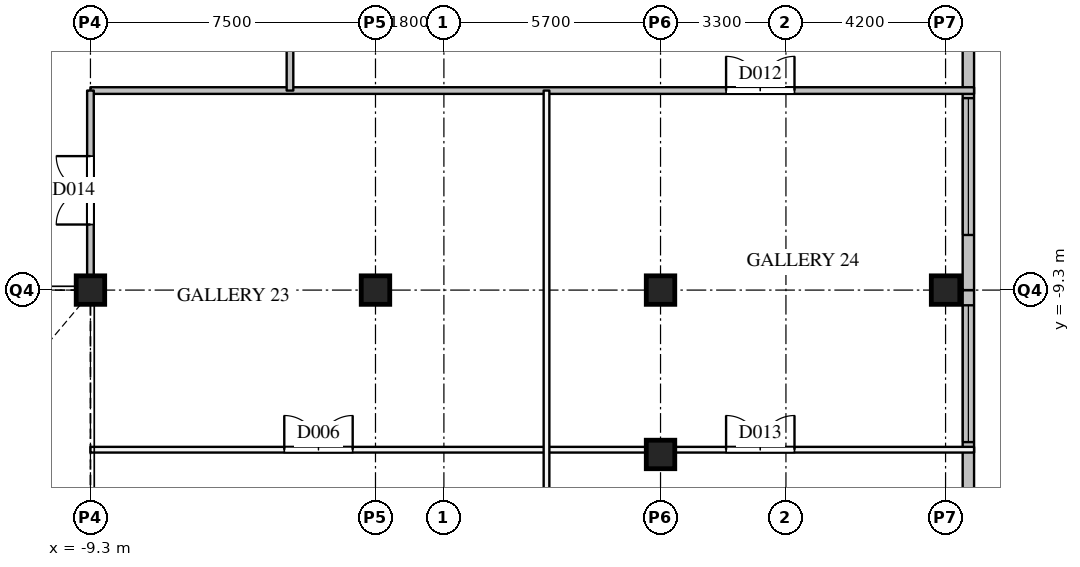
"""IFC4 building model, lengths in metres.
Left out: names, types, materials, properties, quantities, classifications, styles, units other than length and angle.
Written with IfcOpenShell. Run it as: python <this file> out.ifc"""

import sys

from ifc_helpers import new_model, si_unit, direction, frame, frame_2d, origin, origin_2d, place, context, subcontext, project, spatial, rectangle, extrude, element, fill, save


model = new_model("IFC4")
c1 = context("Model", 3, precision=1e-05, world=origin(), true_north=direction((0.0, 1.0)))
c2 = subcontext(c1, "Body", "Model", "MODEL_VIEW")
j1 = project(units=[si_unit("LENGTHUNIT", "METRE"), si_unit("PLANEANGLEUNIT", "RADIAN")], contexts=[c1])
p1 = place(None, origin())
s1 = spatial("IfcSite", under=j1, at=p1, CompositionType="ELEMENT")
p2 = place(p1, origin())
s2 = spatial("IfcBuilding", under=s1, at=p2, CompositionType="ELEMENT")
p3 = place(p2, frame((0.0, 0.0, 21.0)))
s3 = spatial("IfcBuildingStorey", under=s2, at=p3, CompositionType="ELEMENT", Elevation=21.0)
for number, where, z_axis, x_axis in (
    (1, (-9.3, -9.3, 0.0), (0.0, 0.0, 1.0), (1.0, 0.0, 0.0)),
    (2, (-1.8, -9.3, 0.0), (0.0, 0.0, 1.0), (1.0, 0.0, 0.0)),
    (3, (5.7, -9.3, 0.0), (0.0, 0.0, 1.0), (1.0, 0.0, 0.0)),
    (4, (13.2, -9.3, 0.0), (0.0, 0.0, 1.0), (1.0, 0.0, 0.0)),
    (5, (5.7, -13.625, 0.0), (0.0, 0.0, 1.0), (1.0, 0.0, 0.0)),
):
    element("IfcColumn", number, at=place(p3, frame(where, z_axis=z_axis, x_axis=x_axis)), inside=s3, PredefinedType="COLUMN", context=c2, shape_type="SweptSolid", body=[
        extrude(rectangle(XDim=0.75, YDim=0.75, at=origin_2d()), origin(), (0.0, 0.0, 1.0), 5.0),
    ])
p4 = place(p3, frame((13.8, -16.8, 0.0), z_axis=(0.0, 0.0, 1.0), x_axis=(0.0, 1.0, 0.0)))
e6 = element("IfcWall", 6, at=p4, inside=s3, PredefinedType="SOLIDWALL", context=c2, shape_type="SweptSolid", body=[
    extrude(rectangle(XDim=7.5, YDim=0.3, at=frame_2d((3.75, 0.0))), origin(), (0.0, 0.0, 1.0), 4.59),
])
p5 = place(p4, frame((3.5, 0.0, 2.4)))
e7 = element("IfcOpeningElement", 7, at=p5, cuts=e6, PredefinedType="OPENING", context=c2, shape_type="SweptSolid", body=[
    extrude(rectangle(XDim=3.6, YDim=1.2, at=frame_2d((1.8, 0.6))), frame((0.0, 0.16, 0.0), z_axis=(0.0, -1.0, 0.0), x_axis=(1.0, 0.0, 0.0)), (0.0, 0.0, 1.0), 0.32),
])
p6 = place(p3, frame((13.8, -9.3, 0.0), z_axis=(0.0, 0.0, 1.0), x_axis=(0.0, 1.0, 0.0)))
e8 = element("IfcWall", 8, at=p6, inside=s3, PredefinedType="SOLIDWALL", context=c2, shape_type="SweptSolid", body=[
    extrude(rectangle(XDim=7.5, YDim=0.3, at=frame_2d((3.75, 0.0))), origin(), (0.0, 0.0, 1.0), 4.59),
])
p7 = place(p6, frame((1.45, 0.0, 2.4)))
e9 = element("IfcOpeningElement", 9, at=p7, cuts=e8, PredefinedType="OPENING", context=c2, shape_type="SweptSolid", body=[
    extrude(rectangle(XDim=3.6, YDim=1.2, at=frame_2d((1.8, 0.6))), frame((0.0, 0.16, 0.0), z_axis=(0.0, -1.0, 0.0), x_axis=(1.0, 0.0, 0.0)), (0.0, 0.0, 1.0), 0.32),
])
p8 = place(p3, frame((-9.3, -4.05, 0.0), z_axis=(0.0, 0.0, 1.0), x_axis=(1.0, 0.0, 0.0)))
e10 = element("IfcWall", 10, at=p8, inside=s3, PredefinedType="PARTITIONING", context=c2, shape_type="SweptSolid", body=[
    extrude(rectangle(XDim=23.25, YDim=0.175, at=frame_2d((11.625, 0.0))), origin(), (0.0, 0.0, 1.0), 3.79),
])
p9 = place(p8, frame((16.725, 0.0, 0.0)))
e11 = element("IfcOpeningElement", 11, at=p9, cuts=e10, PredefinedType="OPENING", context=c2, shape_type="SweptSolid", body=[
    extrude(rectangle(XDim=1.8, YDim=2.1, at=frame_2d((0.9, 1.05))), frame((0.0, 0.097, 0.0), z_axis=(0.0, -1.0, 0.0), x_axis=(1.0, 0.0, 0.0)), (0.0, 0.0, 1.0), 0.195),
])
p10 = place(p3, frame((-9.3, -9.3, 0.0), z_axis=(0.0, 0.0, 1.0), x_axis=(0.0, 1.0, 0.0)))
e12 = element("IfcWall", 12, at=p10, inside=s3, PredefinedType="PARTITIONING", context=c2, shape_type="SweptSolid", body=[
    extrude(rectangle(XDim=5.25, YDim=0.175, at=frame_2d((2.625, 0.0))), origin(), (0.0, 0.0, 1.0), 3.79),
])
p11 = place(p10, frame((1.725, 0.0, 0.0)))
e13 = element("IfcOpeningElement", 13, at=p11, cuts=e12, PredefinedType="OPENING", context=c2, shape_type="SweptSolid", body=[
    extrude(rectangle(XDim=1.8, YDim=2.1, at=frame_2d((0.9, 1.05))), frame((0.0, 0.097, 0.0), z_axis=(0.0, -1.0, 0.0), x_axis=(1.0, 0.0, 0.0)), (0.0, 0.0, 1.0), 0.195),
])
p12 = place(p3, frame((-4.05, -4.05, 0.0), z_axis=(0.0, 0.0, 1.0), x_axis=(0.0, 1.0, 0.0)))
e14 = element("IfcWall", 14, at=p12, inside=s3, PredefinedType="PARTITIONING", context=c2, shape_type="SweptSolid", body=[
    extrude(rectangle(XDim=63.0, YDim=0.175, at=frame_2d((31.5, 0.0))), origin(), (0.0, 0.0, 1.0), 3.79),
])
p13 = place(p12, frame((52.45, 0.0, 0.0)))
e15 = element("IfcOpeningElement", 15, at=p13, cuts=e14, PredefinedType="OPENING", context=c2, shape_type="SweptSolid", body=[
    extrude(rectangle(XDim=1.0, YDim=2.1, at=frame_2d((0.5, 1.05))), frame((0.0, 0.097, 0.0), z_axis=(0.0, -1.0, 0.0), x_axis=(1.0, 0.0, 0.0)), (0.0, 0.0, 1.0), 0.195),
])
p14 = place(p12, frame((7.525, 0.0, 0.0)))
e16 = element("IfcOpeningElement", 16, at=p14, cuts=e14, PredefinedType="OPENING", context=c2, shape_type="SweptSolid", body=[
    extrude(rectangle(XDim=1.0, YDim=2.1, at=frame_2d((0.5, 1.05))), frame((0.0, 0.097, 0.0), z_axis=(0.0, -1.0, 0.0), x_axis=(1.0, 0.0, 0.0)), (0.0, 0.0, 1.0), 0.195),
])
p15 = place(p12, frame((21.05, 0.0, 0.0)))
e17 = element("IfcOpeningElement", 17, at=p15, cuts=e14, PredefinedType="OPENING", context=c2, shape_type="SweptSolid", body=[
    extrude(rectangle(XDim=1.8, YDim=2.1, at=frame_2d((0.9, 1.05))), frame((0.0, 0.097, 0.0), z_axis=(0.0, -1.0, 0.0), x_axis=(1.0, 0.0, 0.0)), (0.0, 0.0, 1.0), 0.195),
])
p16 = place(p12, frame((32.85, 0.0, 0.0)))
e18 = element("IfcOpeningElement", 18, at=p16, cuts=e14, PredefinedType="OPENING", context=c2, shape_type="SweptSolid", body=[
    extrude(rectangle(XDim=1.8, YDim=2.1, at=frame_2d((0.9, 1.05))), frame((0.0, 0.097, 0.0), z_axis=(0.0, -1.0, 0.0), x_axis=(1.0, 0.0, 0.0)), (0.0, 0.0, 1.0), 0.195),
])
p17 = place(p12, frame((44.65, 0.0, 0.0)))
e19 = element("IfcOpeningElement", 19, at=p17, cuts=e14, PredefinedType="OPENING", context=c2, shape_type="SweptSolid", body=[
    extrude(rectangle(XDim=1.8, YDim=2.1, at=frame_2d((0.9, 1.05))), frame((0.0, 0.097, 0.0), z_axis=(0.0, -1.0, 0.0), x_axis=(1.0, 0.0, 0.0)), (0.0, 0.0, 1.0), 0.195),
])
p18 = place(p3, frame((-9.3, -13.5, 0.0), z_axis=(0.0, 0.0, 1.0), x_axis=(1.0, 0.0, 0.0)))
e20 = element("IfcWall", 20, at=p18, inside=s3, PredefinedType="PARTITIONING", context=c2, shape_type="SweptSolid", body=[
    extrude(rectangle(XDim=23.25, YDim=0.15, at=frame_2d((11.625, 0.0))), origin(), (0.0, 0.0, 1.0), 3.79),
])
p19 = place(p18, frame((5.1, 0.0, 0.0)))
e21 = element("IfcOpeningElement", 21, at=p19, cuts=e20, PredefinedType="OPENING", context=c2, shape_type="SweptSolid", body=[
    extrude(rectangle(XDim=1.8, YDim=2.1, at=frame_2d((0.9, 1.05))), frame((0.0, 0.085, 0.0), z_axis=(0.0, -1.0, 0.0), x_axis=(1.0, 0.0, 0.0)), (0.0, 0.0, 1.0), 0.17),
])
p20 = place(p18, frame((16.725, 0.0, 0.0)))
e22 = element("IfcOpeningElement", 22, at=p20, cuts=e20, PredefinedType="OPENING", context=c2, shape_type="SweptSolid", body=[
    extrude(rectangle(XDim=1.8, YDim=2.1, at=frame_2d((0.9, 1.05))), frame((0.0, 0.085, 0.0), z_axis=(0.0, -1.0, 0.0), x_axis=(1.0, 0.0, 0.0)), (0.0, 0.0, 1.0), 0.17),
])
p21 = place(p3, frame((2.7, -20.95, 0.0), z_axis=(0.0, 0.0, 1.0), x_axis=(0.0, 1.0, 0.0)))
e23 = element("IfcWall", 23, at=p21, inside=s3, PredefinedType="PARTITIONING", context=c2, shape_type="SweptSolid", body=[
    extrude(rectangle(XDim=16.9, YDim=0.15, at=frame_2d((8.45, 0.0))), origin(), (0.0, 0.0, 1.0), 3.79),
])
p22 = place(p5, origin())
e24 = element("IfcWindow", 24, at=p22, inside=s3, PartitioningType="SINGLE_PANEL", PredefinedType="WINDOW", context=c2, shape_type="SweptSolid", body=[
    extrude(rectangle(XDim=3.6, YDim=1.2, at=frame_2d((1.8, 0.6))), frame((0.0, 0.03, 0.0), z_axis=(0.0, -1.0, 0.0), x_axis=(1.0, 0.0, 0.0)), (0.0, 0.0, 1.0), 0.06),
])
fill(e7, e24)
p23 = place(p7, origin())
e25 = element("IfcWindow", 25, at=p23, inside=s3, PartitioningType="SINGLE_PANEL", PredefinedType="WINDOW", context=c2, shape_type="SweptSolid", body=[
    extrude(rectangle(XDim=3.6, YDim=1.2, at=frame_2d((1.8, 0.6))), frame((0.0, 0.03, 0.0), z_axis=(0.0, -1.0, 0.0), x_axis=(1.0, 0.0, 0.0)), (0.0, 0.0, 1.0), 0.06),
])
fill(e9, e25)
p24 = place(p19, origin())
e26 = element("IfcDoor", 26, at=p24, inside=s3, OperationType="DOUBLE_DOOR_SINGLE_SWING", PredefinedType="DOOR", context=c2, shape_type="SweptSolid", body=[
    extrude(rectangle(XDim=1.8, YDim=2.1, at=frame_2d((0.9, 1.05))), frame((0.0, 0.025, 0.0), z_axis=(0.0, -1.0, 0.0), x_axis=(1.0, 0.0, 0.0)), (0.0, 0.0, 1.0), 0.05),
])
fill(e21, e26)
p25 = place(p9, origin())
e27 = element("IfcDoor", 27, at=p25, inside=s3, OperationType="DOUBLE_DOOR_SINGLE_SWING", PredefinedType="DOOR", context=c2, shape_type="SweptSolid", body=[
    extrude(rectangle(XDim=1.8, YDim=2.1, at=frame_2d((0.9, 1.05))), frame((0.0, 0.025, 0.0), z_axis=(0.0, -1.0, 0.0), x_axis=(1.0, 0.0, 0.0)), (0.0, 0.0, 1.0), 0.05),
])
fill(e11, e27)
p26 = place(p20, origin())
e28 = element("IfcDoor", 28, at=p26, inside=s3, OperationType="DOUBLE_DOOR_SINGLE_SWING", PredefinedType="DOOR", context=c2, shape_type="SweptSolid", body=[
    extrude(rectangle(XDim=1.8, YDim=2.1, at=frame_2d((0.9, 1.05))), frame((0.0, 0.025, 0.0), z_axis=(0.0, -1.0, 0.0), x_axis=(1.0, 0.0, 0.0)), (0.0, 0.0, 1.0), 0.05),
])
fill(e22, e28)
p27 = place(p11, origin())
e29 = element("IfcDoor", 29, at=p27, inside=s3, OperationType="DOUBLE_DOOR_SINGLE_SWING", PredefinedType="DOOR", context=c2, shape_type="SweptSolid", body=[
    extrude(rectangle(XDim=1.8, YDim=2.1, at=frame_2d((0.9, 1.05))), frame((0.0, 0.025, 0.0), z_axis=(0.0, -1.0, 0.0), x_axis=(1.0, 0.0, 0.0)), (0.0, 0.0, 1.0), 0.05),
])
fill(e13, e29)
save(model, sys.argv[1])
